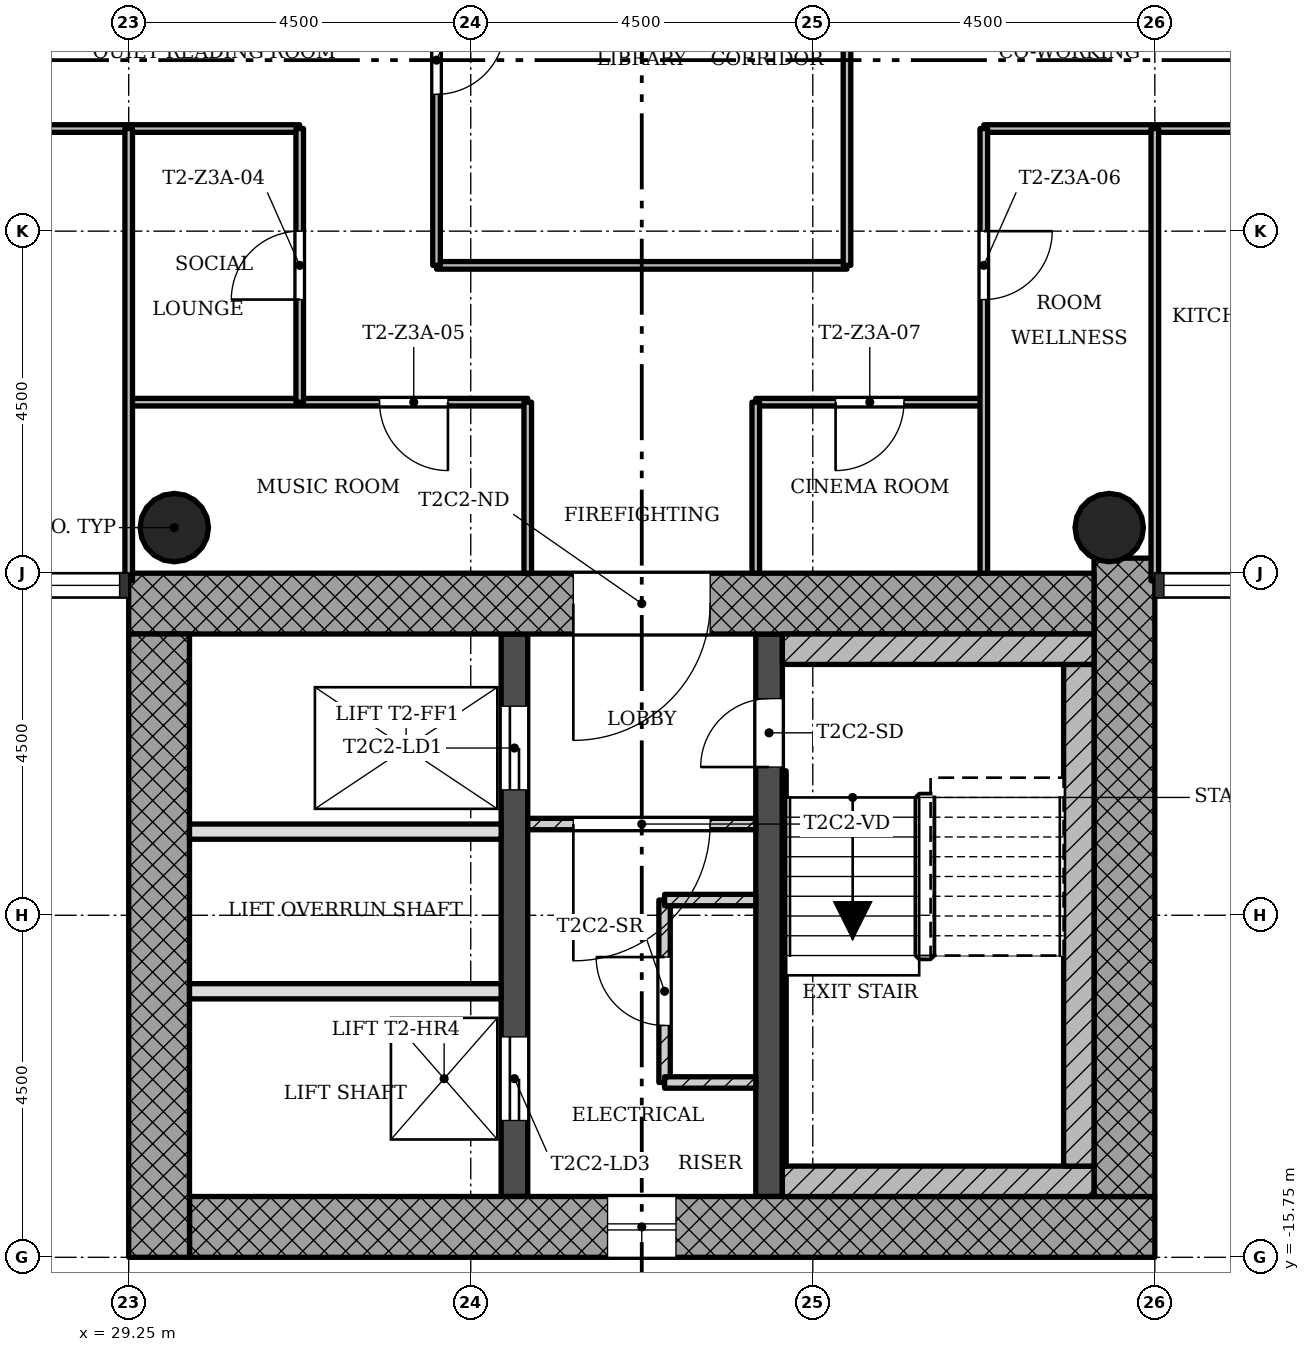
"""IFC4 building model, lengths in metres.
Left out: names, types, materials, properties, quantities, classifications, styles, units other than length and angle.
Written with IfcOpenShell. Run it as: python <this file> out.ifc"""

import sys

from ifc_helpers import new_model, si_unit, direction, frame, frame_2d, origin, origin_2d, place, context, subcontext, project, spatial, rectangle, hollow_circle, extrude, element, fill, save


model = new_model("IFC4")
c1 = context("Model", 3, precision=1e-05, world=origin(), true_north=direction((0.0, 1.0)))
c2 = subcontext(c1, "Body", "Model", "MODEL_VIEW")
j1 = project(units=[si_unit("LENGTHUNIT", "METRE"), si_unit("PLANEANGLEUNIT", "RADIAN")], contexts=[c1])
p1 = place(None, origin())
s1 = spatial("IfcSite", under=j1, at=p1, CompositionType="ELEMENT")
p2 = place(p1, origin())
s2 = spatial("IfcBuilding", under=s1, at=p2, CompositionType="ELEMENT")
p3 = place(p2, frame((0.0, 0.0, 133.7)))
s3 = spatial("IfcBuildingStorey", under=s2, at=p3, CompositionType="ELEMENT", Elevation=133.7)
p4 = place(p3, frame((30.05, -15.35, 0.0), z_axis=(0.0, 0.0, 1.0), x_axis=(1.0, 0.0, 0.0)))
e1 = element("IfcWall", 1, at=p4, inside=s3, PredefinedType="SHEAR", context=c2, shape_type="SweptSolid", body=[
    extrude(rectangle(XDim=12.7, YDim=0.8, at=frame_2d((6.35, 0.0))), origin(), (0.0, 0.0, 1.0), 3.4),
])
p5 = place(p4, frame((5.5, 0.0, 0.45)))
e2 = element("IfcOpeningElement", 2, at=p5, cuts=e1, PredefinedType="OPENING", context=c2, shape_type="SweptSolid", body=[
    extrude(rectangle(XDim=0.9, YDim=2.4, at=frame_2d((0.45, 1.2))), frame((0.0, 0.41, 0.0), z_axis=(0.0, -1.0, 0.0), x_axis=(1.0, 0.0, 0.0)), (0.0, 0.0, 1.0), 0.82),
])
p6 = place(p3, frame((42.35, -14.95, 0.0), z_axis=(0.0, 0.0, 1.0), x_axis=(0.0, 1.0, 0.0)))
e3 = element("IfcWall", 3, at=p6, inside=s3, PredefinedType="SHEAR", context=c2, shape_type="SweptSolid", body=[
    extrude(rectangle(XDim=8.398, YDim=0.8, at=frame_2d((4.199, 0.0))), origin(), (0.0, 0.0, 1.0), 3.4),
])
p7 = place(p3, frame((41.95, -7.15, 0.0), z_axis=(0.0, 0.0, 1.0), x_axis=(-1.0, 0.0, 0.0)))
e4 = element("IfcWall", 4, at=p7, inside=s3, PredefinedType="SHEAR", context=c2, shape_type="SweptSolid", body=[
    extrude(rectangle(XDim=12.7, YDim=0.8, at=frame_2d((6.35, 0.0))), origin(), (0.0, 0.0, 1.0), 3.4),
])
p8 = place(p7, frame((5.05, 0.0, 0.0)))
e5 = element("IfcOpeningElement", 5, at=p8, cuts=e4, PredefinedType="OPENING", context=c2, shape_type="SweptSolid", body=[
    extrude(rectangle(XDim=1.8, YDim=2.1, at=frame_2d((0.9, 1.05))), frame((0.0, 0.41, 0.0), z_axis=(0.0, -1.0, 0.0), x_axis=(1.0, 0.0, 0.0)), (0.0, 0.0, 1.0), 0.82),
])
p9 = place(p3, frame((29.65, -7.55, 0.0), z_axis=(0.0, 0.0, 1.0), x_axis=(0.0, -1.0, 0.0)))
e6 = element("IfcWall", 6, at=p9, inside=s3, PredefinedType="SHEAR", context=c2, shape_type="SweptSolid", body=[
    extrude(rectangle(XDim=8.2, YDim=0.8, at=frame_2d((4.1, 0.0))), origin(), (0.0, 0.0, 1.0), 3.4),
])
p10 = place(p3, frame((34.325, -14.95, 0.0), z_axis=(0.0, 0.0, 1.0), x_axis=(0.0, 1.0, 0.0)))
e7 = element("IfcWall", 7, at=p10, inside=s3, PredefinedType="SHEAR", context=c2, shape_type="SweptSolid", body=[
    extrude(rectangle(XDim=7.4, YDim=0.35, at=frame_2d((3.7, 0.0))), origin(), (0.0, 0.0, 1.0), 3.4),
])
p11 = place(p10, frame((5.35, 0.0, 0.0)))
e8 = element("IfcOpeningElement", 8, at=p11, cuts=e7, PredefinedType="OPENING", context=c2, shape_type="SweptSolid", body=[
    extrude(rectangle(XDim=1.1, YDim=2.1, at=frame_2d((0.55, 1.05))), frame((0.0, 0.185, 0.0), z_axis=(0.0, -1.0, 0.0), x_axis=(1.0, 0.0, 0.0)), (0.0, 0.0, 1.0), 0.37),
])
p12 = place(p10, frame((1.0, 0.0, 0.0)))
e9 = element("IfcOpeningElement", 9, at=p12, cuts=e7, PredefinedType="OPENING", context=c2, shape_type="SweptSolid", body=[
    extrude(rectangle(XDim=1.1, YDim=2.1, at=frame_2d((0.55, 1.05))), frame((0.0, 0.185, 0.0), z_axis=(0.0, -1.0, 0.0), x_axis=(1.0, 0.0, 0.0)), (0.0, 0.0, 1.0), 0.37),
])
p13 = place(p3, frame((37.675, -14.95, 0.0), z_axis=(0.0, 0.0, 1.0), x_axis=(0.0, 1.0, 0.0)))
e10 = element("IfcWall", 10, at=p13, inside=s3, PredefinedType="SHEAR", context=c2, shape_type="SweptSolid", body=[
    extrude(rectangle(XDim=7.4, YDim=0.35, at=frame_2d((3.7, 0.0))), origin(), (0.0, 0.0, 1.0), 3.4),
])
p14 = place(p13, frame((5.65, 0.0, 0.0)))
e11 = element("IfcOpeningElement", 11, at=p14, cuts=e10, PredefinedType="OPENING", context=c2, shape_type="SweptSolid", body=[
    extrude(rectangle(XDim=0.9, YDim=2.1, at=frame_2d((0.45, 1.05))), frame((0.0, 0.185, 0.0), z_axis=(0.0, -1.0, 0.0), x_axis=(1.0, 0.0, 0.0)), (0.0, 0.0, 1.0), 0.37),
])
for number, where, z_axis, x_axis in (
    (12, (42.15, -6.15, 0.0), (0.0, 0.0, 1.0), (1.0, 0.0, 0.0)),
    (13, (29.85, -6.15, 0.0), (0.0, 0.0, 1.0), (1.0, 0.0, 0.0)),
):
    element("IfcColumn", number, at=place(p3, frame(where, z_axis=z_axis, x_axis=x_axis)), inside=s3, PredefinedType="COLUMN", context=c2, shape_type="SweptSolid", body=[
        extrude(hollow_circle(Radius=0.45, WallThickness=0.032, at=origin_2d()), origin(), (0.0, 0.0, 1.0), 3.4),
    ])
p15 = place(p3, frame((34.5, -10.05, 0.0), z_axis=(0.0, 0.0, 1.0), x_axis=(1.0, 0.0, 0.0)))
e14 = element("IfcWall", 14, at=p15, inside=s3, PredefinedType="PARTITIONING", context=c2, shape_type="SweptSolid", body=[
    extrude(rectangle(XDim=3.0, YDim=0.15, at=frame_2d((1.5, 0.0))), origin(), (0.0, 0.0, 1.0), 3.0),
])
p16 = place(p15, frame((0.6, 0.0, 0.0)))
e15 = element("IfcOpeningElement", 15, at=p16, cuts=e14, PredefinedType="OPENING", context=c2, shape_type="SweptSolid", body=[
    extrude(rectangle(XDim=1.8, YDim=2.1, at=frame_2d((0.9, 1.05))), frame((0.0, 0.085, 0.0), z_axis=(0.0, -1.0, 0.0), x_axis=(1.0, 0.0, 0.0)), (0.0, 0.0, 1.0), 0.17),
])
for number, where, z_axis, x_axis in (
    (16, (30.05, -10.15, 0.0), (0.0, 0.0, 1.0), (1.0, 0.0, 0.0)),
    (17, (30.05, -12.25, 0.0), (0.0, 0.0, 1.0), (1.0, 0.0, 0.0)),
):
    element("IfcWall", number, at=place(p3, frame(where, z_axis=z_axis, x_axis=x_axis)), inside=s3, PredefinedType="SOLIDWALL", context=c2, shape_type="SweptSolid", body=[
        extrude(rectangle(XDim=4.1, YDim=0.2, at=frame_2d((2.05, 0.0))), origin(), (0.0, 0.0, 1.0), 3.0),
    ])
p17 = place(p3, frame((36.3, -11.05, 0.0), z_axis=(0.0, 0.0, 1.0), x_axis=(0.0, -1.0, 0.0)))
e18 = element("IfcWall", 18, at=p17, inside=s3, PredefinedType="PARTITIONING", context=c2, shape_type="SweptSolid", body=[
    extrude(rectangle(XDim=2.4, YDim=0.15, at=frame_2d((1.2, 0.0))), origin(), (0.0, 0.0, 1.0), 3.0),
])
p18 = place(p17, frame((0.75, 0.0, 0.0)))
e19 = element("IfcOpeningElement", 19, at=p18, cuts=e18, PredefinedType="OPENING", context=c2, shape_type="SweptSolid", body=[
    extrude(rectangle(XDim=0.9, YDim=2.1, at=frame_2d((0.45, 1.05))), frame((0.0, 0.085, 0.0), z_axis=(0.0, -1.0, 0.0), x_axis=(1.0, 0.0, 0.0)), (0.0, 0.0, 1.0), 0.17),
])
for number, where, z_axis, x_axis in (
    (20, (36.3, -11.05, 0.0), (0.0, 0.0, 1.0), (1.0, 0.0, 0.0)),
    (21, (36.3, -13.45, 0.0), (0.0, 0.0, 1.0), (1.0, 0.0, 0.0)),
):
    element("IfcWall", number, at=place(p3, frame(where, z_axis=z_axis, x_axis=x_axis)), inside=s3, PredefinedType="PARTITIONING", context=c2, shape_type="SweptSolid", body=[
        extrude(rectangle(XDim=1.2, YDim=0.15, at=frame_2d((0.6, 0.0))), origin(), (0.0, 0.0, 1.0), 3.0),
    ])
p19 = place(p3, frame((40.5, -4.5, 0.0), z_axis=(0.0, 0.0, 1.0), x_axis=(-1.0, 0.0, 0.0)))
e22 = element("IfcWall", 22, at=p19, inside=s3, PredefinedType="PARTITIONING", context=c2, shape_type="SweptSolid", body=[
    extrude(rectangle(XDim=3.0, YDim=0.1, at=frame_2d((1.5, 0.0))), origin(), (0.0, 0.0, 1.0), 3.0),
])
p20 = place(p19, frame((1.05, 0.0, 0.0)))
e23 = element("IfcOpeningElement", 23, at=p20, cuts=e22, PredefinedType="OPENING", context=c2, shape_type="SweptSolid", body=[
    extrude(rectangle(XDim=0.9, YDim=2.1, at=frame_2d((0.45, 1.05))), frame((0.0, 0.06, 0.0), z_axis=(0.0, -1.0, 0.0), x_axis=(1.0, 0.0, 0.0)), (0.0, 0.0, 1.0), 0.12),
])
p21 = place(p3, frame((34.5, -4.5, 0.0), z_axis=(0.0, 0.0, 1.0), x_axis=(-1.0, 0.0, 0.0)))
e24 = element("IfcWall", 24, at=p21, inside=s3, PredefinedType="PARTITIONING", context=c2, shape_type="SweptSolid", body=[
    extrude(rectangle(XDim=5.25, YDim=0.1, at=frame_2d((2.625, 0.0))), origin(), (0.0, 0.0, 1.0), 3.0),
])
p22 = place(p21, frame((1.05, 0.0, 0.0)))
e25 = element("IfcOpeningElement", 25, at=p22, cuts=e24, PredefinedType="OPENING", context=c2, shape_type="SweptSolid", body=[
    extrude(rectangle(XDim=0.9, YDim=2.1, at=frame_2d((0.45, 1.05))), frame((0.0, 0.06, 0.0), z_axis=(0.0, -1.0, 0.0), x_axis=(1.0, 0.0, 0.0)), (0.0, 0.0, 1.0), 0.12),
])
p23 = place(p3, frame((38.7, -2.7, 0.0), z_axis=(0.0, 0.0, 1.0), x_axis=(-1.0, 0.0, 0.0)))
e26 = element("IfcWall", 26, at=p23, inside=s3, PredefinedType="PARTITIONING", context=c2, shape_type="SweptSolid", body=[
    extrude(rectangle(XDim=5.4, YDim=0.1, at=frame_2d((2.7, 0.0))), origin(), (0.0, 0.0, 1.0), 3.0),
])
p24 = place(p3, frame((47.25, -0.9, 0.0), z_axis=(0.0, 0.0, 1.0), x_axis=(-1.0, 0.0, 0.0)))
e27 = element("IfcWall", 27, at=p24, inside=s3, PredefinedType="PARTITIONING", context=c2, shape_type="SweptSolid", body=[
    extrude(rectangle(XDim=6.75, YDim=0.1, at=frame_2d((3.375, 0.0))), origin(), (0.0, 0.0, 1.0), 3.0),
])
p25 = place(p24, frame((1.8, 0.0, 0.0)))
e28 = element("IfcOpeningElement", 28, at=p25, cuts=e27, PredefinedType="OPENING", context=c2, shape_type="SweptSolid", body=[
    extrude(rectangle(XDim=0.9, YDim=2.1, at=frame_2d((0.45, 1.05))), frame((0.0, 0.06, 0.0), z_axis=(0.0, -1.0, 0.0), x_axis=(1.0, 0.0, 0.0)), (0.0, 0.0, 1.0), 0.12),
])
p26 = place(p3, frame((31.5, -0.9, 0.0), z_axis=(0.0, 0.0, 1.0), x_axis=(-1.0, 0.0, 0.0)))
e29 = element("IfcWall", 29, at=p26, inside=s3, PredefinedType="PARTITIONING", context=c2, shape_type="SweptSolid", body=[
    extrude(rectangle(XDim=4.05, YDim=0.1, at=frame_2d((2.025, 0.0))), origin(), (0.0, 0.0, 1.0), 3.0),
])
p27 = place(p3, frame((42.75, -6.85, 0.0), z_axis=(0.0, 0.0, 1.0), x_axis=(0.0, 1.0, 0.0)))
e30 = element("IfcWall", 30, at=p27, inside=s3, PredefinedType="PARTITIONING", context=c2, shape_type="SweptSolid", body=[
    extrude(rectangle(XDim=5.95, YDim=0.1, at=frame_2d((2.975, 0.0))), origin(), (0.0, 0.0, 1.0), 3.0),
])
p28 = place(p3, frame((40.5, -6.75, 0.0), z_axis=(0.0, 0.0, 1.0), x_axis=(0.0, 1.0, 0.0)))
e31 = element("IfcWall", 31, at=p28, inside=s3, PredefinedType="PARTITIONING", context=c2, shape_type="SweptSolid", body=[
    extrude(rectangle(XDim=5.85, YDim=0.1, at=frame_2d((2.925, 0.0))), origin(), (0.0, 0.0, 1.0), 3.0),
])
p29 = place(p28, frame((3.6, 0.0, 0.0)))
e32 = element("IfcOpeningElement", 32, at=p29, cuts=e31, PredefinedType="OPENING", context=c2, shape_type="SweptSolid", body=[
    extrude(rectangle(XDim=0.9, YDim=2.1, at=frame_2d((0.45, 1.05))), frame((0.0, 0.06, 0.0), z_axis=(0.0, -1.0, 0.0), x_axis=(1.0, 0.0, 0.0)), (0.0, 0.0, 1.0), 0.12),
])
p30 = place(p3, frame((38.7, -2.7, 0.0), z_axis=(0.0, 0.0, 1.0), x_axis=(0.0, 1.0, 0.0)))
e33 = element("IfcWall", 33, at=p30, inside=s3, PredefinedType="PARTITIONING", context=c2, shape_type="SweptSolid", body=[
    extrude(rectangle(XDim=5.4, YDim=0.1, at=frame_2d((2.7, 0.0))), origin(), (0.0, 0.0, 1.0), 3.0),
])
for number, where, z_axis, x_axis in (
    (34, (37.5, -6.75, 0.0), (0.0, 0.0, 1.0), (0.0, 1.0, 0.0)),
    (35, (34.5, -6.75, 0.0), (0.0, 0.0, 1.0), (0.0, 1.0, 0.0)),
):
    element("IfcWall", number, at=place(p3, frame(where, z_axis=z_axis, x_axis=x_axis)), inside=s3, PredefinedType="PARTITIONING", context=c2, shape_type="SweptSolid", body=[
        extrude(rectangle(XDim=2.25, YDim=0.1, at=frame_2d((1.125, 0.0))), origin(), (0.0, 0.0, 1.0), 3.0),
    ])
p31 = place(p3, frame((33.3, -2.7, 0.0), z_axis=(0.0, 0.0, 1.0), x_axis=(0.0, 1.0, 0.0)))
e36 = element("IfcWall", 36, at=p31, inside=s3, PredefinedType="PARTITIONING", context=c2, shape_type="SweptSolid", body=[
    extrude(rectangle(XDim=5.4, YDim=0.1, at=frame_2d((2.7, 0.0))), origin(), (0.0, 0.0, 1.0), 3.0),
])
p32 = place(p31, frame((2.25, 0.0, 0.0)))
e37 = element("IfcOpeningElement", 37, at=p32, cuts=e36, PredefinedType="OPENING", context=c2, shape_type="SweptSolid", body=[
    extrude(rectangle(XDim=0.9, YDim=2.1, at=frame_2d((0.45, 1.05))), frame((0.0, 0.06, 0.0), z_axis=(0.0, -1.0, 0.0), x_axis=(1.0, 0.0, 0.0)), (0.0, 0.0, 1.0), 0.12),
])
p33 = place(p3, frame((31.5, -4.5, 0.0), z_axis=(0.0, 0.0, 1.0), x_axis=(0.0, 1.0, 0.0)))
e38 = element("IfcWall", 38, at=p33, inside=s3, PredefinedType="PARTITIONING", context=c2, shape_type="SweptSolid", body=[
    extrude(rectangle(XDim=3.6, YDim=0.1, at=frame_2d((1.8, 0.0))), origin(), (0.0, 0.0, 1.0), 3.0),
])
p34 = place(p33, frame((1.35, 0.0, 0.0)))
e39 = element("IfcOpeningElement", 39, at=p34, cuts=e38, PredefinedType="OPENING", context=c2, shape_type="SweptSolid", body=[
    extrude(rectangle(XDim=0.9, YDim=2.1, at=frame_2d((0.45, 1.05))), frame((0.0, 0.06, 0.0), z_axis=(0.0, -1.0, 0.0), x_axis=(1.0, 0.0, 0.0)), (0.0, 0.0, 1.0), 0.12),
])
p35 = place(p3, frame((29.25, -6.85, 0.0), z_axis=(0.0, 0.0, 1.0), x_axis=(0.0, 1.0, 0.0)))
e40 = element("IfcWall", 40, at=p35, inside=s3, PredefinedType="PARTITIONING", context=c2, shape_type="SweptSolid", body=[
    extrude(rectangle(XDim=5.95, YDim=0.1, at=frame_2d((2.975, 0.0))), origin(), (0.0, 0.0, 1.0), 3.0),
])
p36 = place(p3, frame((37.85, -14.75, 0.0), z_axis=(0.0, 0.0, 1.0), x_axis=(1.0, 0.0, 0.0)))
e41 = element("IfcWall", 41, at=p36, inside=s3, PredefinedType="SHEAR", context=c2, shape_type="SweptSolid", body=[
    extrude(rectangle(XDim=4.1, YDim=0.4, at=frame_2d((2.05, 0.0))), origin(), (0.0, 0.0, 1.0), 3.4),
])
p37 = place(p3, frame((41.75, -7.95, 0.0), z_axis=(0.0, 0.0, 1.0), x_axis=(0.0, -1.0, 0.0)))
e42 = element("IfcWall", 42, at=p37, inside=s3, PredefinedType="SHEAR", context=c2, shape_type="SweptSolid", body=[
    extrude(rectangle(XDim=6.6, YDim=0.4, at=frame_2d((3.3, 0.0))), origin(), (0.0, 0.0, 1.0), 3.4),
])
p38 = place(p3, frame((37.85, -7.75, 0.0), z_axis=(0.0, 0.0, 1.0), x_axis=(1.0, 0.0, 0.0)))
e43 = element("IfcWall", 43, at=p38, inside=s3, PredefinedType="SHEAR", context=c2, shape_type="SweptSolid", body=[
    extrude(rectangle(XDim=4.1, YDim=0.4, at=frame_2d((2.05, 0.0))), origin(), (0.0, 0.0, 1.0), 3.4),
])
p39 = place(p3, frame((37.875, -9.35, 0.0), z_axis=(0.0, 0.0, 1.0), x_axis=(0.0, -1.0, 0.0)))
e44 = element("IfcWall", 44, at=p39, inside=s3, PredefinedType="SHEAR", context=c2, shape_type="SweptSolid", body=[
    extrude(rectangle(XDim=5.2, YDim=0.05, at=frame_2d((2.6, 0.0))), origin(), (0.0, 0.0, 1.0), 3.4),
])
p40 = place(p5, origin())
e45 = element("IfcWindow", 45, at=p40, inside=s3, PartitioningType="SINGLE_PANEL", PredefinedType="WINDOW", context=c2, shape_type="SweptSolid", body=[
    extrude(rectangle(XDim=0.9, YDim=2.4, at=frame_2d((0.45, 1.2))), frame((0.0, 0.03, 0.0), z_axis=(0.0, -1.0, 0.0), x_axis=(1.0, 0.0, 0.0)), (0.0, 0.0, 1.0), 0.06),
])
fill(e2, e45)
p41 = place(p16, origin())
e46 = element("IfcDoor", 46, at=p41, inside=s3, OperationType="SINGLE_SWING_LEFT", PredefinedType="DOOR", context=c2, shape_type="SweptSolid", body=[
    extrude(rectangle(XDim=1.8, YDim=2.1, at=frame_2d((0.9, 1.05))), frame((0.0, 0.025, 0.0), z_axis=(0.0, -1.0, 0.0), x_axis=(1.0, 0.0, 0.0)), (0.0, 0.0, 1.0), 0.05),
])
fill(e15, e46)
p42 = place(p18, origin())
e47 = element("IfcDoor", 47, at=p42, inside=s3, OperationType="SINGLE_SWING_LEFT", PredefinedType="DOOR", context=c2, shape_type="SweptSolid", body=[
    extrude(rectangle(XDim=0.9, YDim=2.1, at=frame_2d((0.45, 1.05))), frame((0.0, 0.025, 0.0), z_axis=(0.0, -1.0, 0.0), x_axis=(1.0, 0.0, 0.0)), (0.0, 0.0, 1.0), 0.05),
])
fill(e19, e47)
p43 = place(p32, origin())
e48 = element("IfcDoor", 48, at=p43, inside=s3, OperationType="SINGLE_SWING_RIGHT", PredefinedType="DOOR", context=c2, shape_type="SweptSolid", body=[
    extrude(rectangle(XDim=0.9, YDim=2.1, at=frame_2d((0.45, 1.05))), frame((0.0, 0.025, 0.0), z_axis=(0.0, -1.0, 0.0), x_axis=(1.0, 0.0, 0.0)), (0.0, 0.0, 1.0), 0.05),
])
fill(e37, e48)
p44 = place(p34, origin())
e49 = element("IfcDoor", 49, at=p44, inside=s3, OperationType="SINGLE_SWING_RIGHT", PredefinedType="DOOR", context=c2, shape_type="SweptSolid", body=[
    extrude(rectangle(XDim=0.9, YDim=2.1, at=frame_2d((0.45, 1.05))), frame((0.0, 0.025, 0.0), z_axis=(0.0, -1.0, 0.0), x_axis=(1.0, 0.0, 0.0)), (0.0, 0.0, 1.0), 0.05),
])
fill(e39, e49)
p45 = place(p22, origin())
e50 = element("IfcDoor", 50, at=p45, inside=s3, OperationType="SINGLE_SWING_RIGHT", PredefinedType="DOOR", context=c2, shape_type="SweptSolid", body=[
    extrude(rectangle(XDim=0.9, YDim=2.1, at=frame_2d((0.45, 1.05))), frame((0.0, 0.025, 0.0), z_axis=(0.0, -1.0, 0.0), x_axis=(1.0, 0.0, 0.0)), (0.0, 0.0, 1.0), 0.05),
])
fill(e25, e50)
p46 = place(p29, origin())
e51 = element("IfcDoor", 51, at=p46, inside=s3, OperationType="SINGLE_SWING_RIGHT", PredefinedType="DOOR", context=c2, shape_type="SweptSolid", body=[
    extrude(rectangle(XDim=0.9, YDim=2.1, at=frame_2d((0.45, 1.05))), frame((0.0, 0.025, 0.0), z_axis=(0.0, -1.0, 0.0), x_axis=(1.0, 0.0, 0.0)), (0.0, 0.0, 1.0), 0.05),
])
fill(e32, e51)
p47 = place(p20, origin())
e52 = element("IfcDoor", 52, at=p47, inside=s3, OperationType="SINGLE_SWING_LEFT", PredefinedType="DOOR", context=c2, shape_type="SweptSolid", body=[
    extrude(rectangle(XDim=0.9, YDim=2.1, at=frame_2d((0.45, 1.05))), frame((0.0, 0.025, 0.0), z_axis=(0.0, -1.0, 0.0), x_axis=(1.0, 0.0, 0.0)), (0.0, 0.0, 1.0), 0.05),
])
fill(e23, e52)
p48 = place(p14, origin())
e53 = element("IfcDoor", 53, at=p48, inside=s3, OperationType="SINGLE_SWING_RIGHT", PredefinedType="DOOR", context=c2, shape_type="SweptSolid", body=[
    extrude(rectangle(XDim=0.9, YDim=2.1, at=frame_2d((0.45, 1.05))), frame((0.0, 0.025, 0.0), z_axis=(0.0, -1.0, 0.0), x_axis=(1.0, 0.0, 0.0)), (0.0, 0.0, 1.0), 0.05),
])
fill(e11, e53)
p49 = place(p11, origin())
e54 = element("IfcDoor", 54, at=p49, inside=s3, OperationType="SLIDING_TO_LEFT", PredefinedType="DOOR", context=c2, shape_type="SweptSolid", body=[
    extrude(rectangle(XDim=1.1, YDim=2.1, at=frame_2d((0.55, 1.05))), frame((0.0, 0.025, 0.0), z_axis=(0.0, -1.0, 0.0), x_axis=(1.0, 0.0, 0.0)), (0.0, 0.0, 1.0), 0.05),
])
fill(e8, e54)
p50 = place(p12, origin())
e55 = element("IfcDoor", 55, at=p50, inside=s3, OperationType="SLIDING_TO_LEFT", PredefinedType="DOOR", context=c2, shape_type="SweptSolid", body=[
    extrude(rectangle(XDim=1.1, YDim=2.1, at=frame_2d((0.55, 1.05))), frame((0.0, 0.025, 0.0), z_axis=(0.0, -1.0, 0.0), x_axis=(1.0, 0.0, 0.0)), (0.0, 0.0, 1.0), 0.05),
])
fill(e9, e55)
p51 = place(p8, origin())
e56 = element("IfcDoor", 56, at=p51, inside=s3, OperationType="SINGLE_SWING_LEFT", PredefinedType="DOOR", context=c2, shape_type="SweptSolid", body=[
    extrude(rectangle(XDim=1.8, YDim=2.1, at=frame_2d((0.9, 1.05))), frame((0.0, 0.025, 0.0), z_axis=(0.0, -1.0, 0.0), x_axis=(1.0, 0.0, 0.0)), (0.0, 0.0, 1.0), 0.05),
])
fill(e5, e56)
save(model, sys.argv[1])
